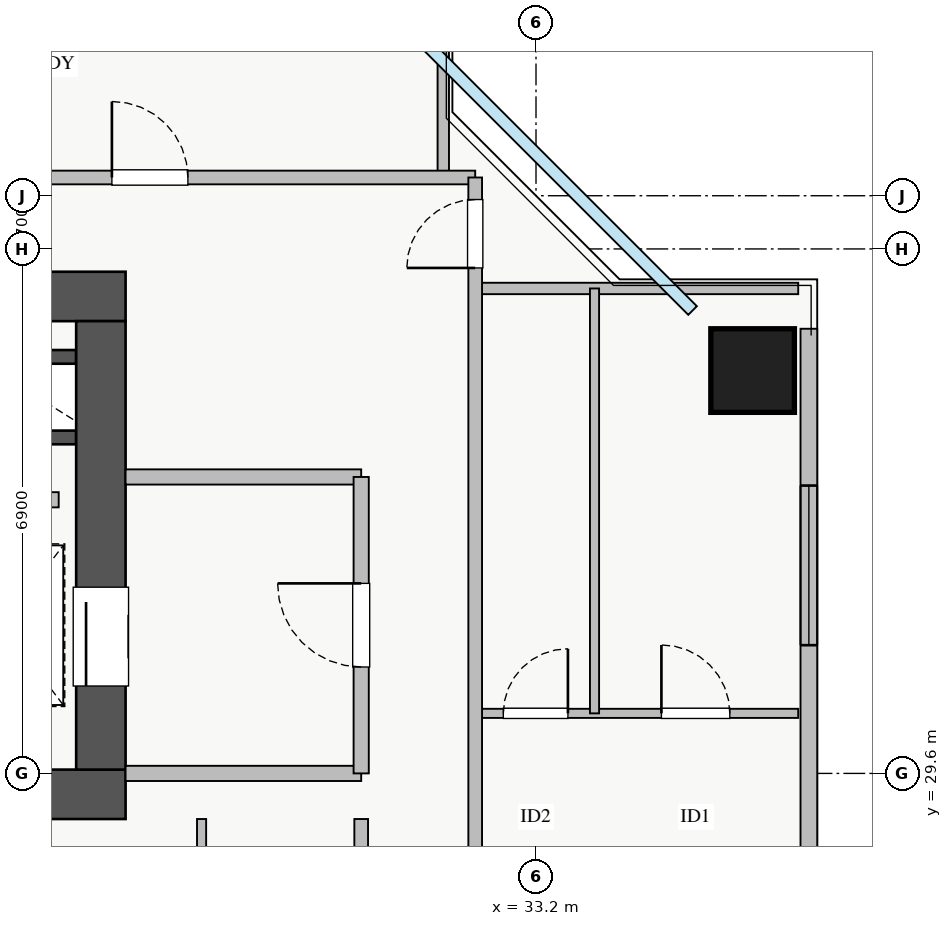
"""IFC4 building model, lengths in metres.
Left out: names, types, materials, properties, quantities, classifications, styles, units other than length and angle.
Written with IfcOpenShell. Run it as: python <this file> out.ifc"""

import sys

from ifc_helpers import new_model, si_unit, direction, frame, frame_2d, origin, origin_2d, place, context, subcontext, project, spatial, rectangle, extrude, source, transform, mapped, element, fill, save


model = new_model("IFC4")
c1 = context("Model", 3, precision=1e-05, world=origin(), true_north=direction((0.0, 1.0)))
c2 = subcontext(c1, "Body", "Model", "MODEL_VIEW")
j1 = project(units=[si_unit("LENGTHUNIT", "METRE"), si_unit("PLANEANGLEUNIT", "RADIAN")], contexts=[c1])
p1 = place(None, origin())
s1 = spatial("IfcSite", under=j1, at=p1, CompositionType="ELEMENT")
p2 = place(p1, origin())
s2 = spatial("IfcBuilding", under=s1, at=p2, CompositionType="ELEMENT")
p3 = place(p2, frame((0.0, 0.0, 136.0)))
s3 = spatial("IfcBuildingStorey", under=s2, at=p3, CompositionType="ELEMENT", Elevation=136.0)
for number, where, z_axis, x_axis in (
    (1, (25.8, 35.08, 0.0), (0.0, 0.0, 1.0), (1.0, 0.0, 0.0)),
    (2, (25.8, 34.02, 0.0), (0.0, 0.0, 1.0), (1.0, 0.0, 0.0)),
):
    element("IfcWall", number, at=place(p3, frame(where, z_axis=z_axis, x_axis=x_axis)), inside=s3, PredefinedType="SHEAR", context=c2, shape_type="SweptSolid", body=[
        extrude(rectangle(XDim=1.35, YDim=0.18, at=frame_2d((0.675, 0.0))), origin(), (0.0, 0.0, 1.0), 3.03),
    ])
p4 = place(p3, frame((10.2, 29.325, 0.0), z_axis=(0.0, 0.0, 1.0), x_axis=(1.0, 0.0, 0.0)))
e3 = element("IfcWall", 3, at=p4, inside=s3, PredefinedType="SHEAR", context=c2, shape_type="SweptSolid", body=[
    extrude(rectangle(XDim=17.6, YDim=0.65, at=frame_2d((8.8, 0.0))), origin(), (0.0, 0.0, 1.0), 3.25),
])
p5 = place(p3, frame((10.2, 35.875, 0.0), z_axis=(0.0, 0.0, 1.0), x_axis=(1.0, 0.0, 0.0)))
e4 = element("IfcWall", 4, at=p5, inside=s3, PredefinedType="SHEAR", context=c2, shape_type="SweptSolid", body=[
    extrude(rectangle(XDim=17.6, YDim=0.65, at=frame_2d((8.8, 0.0))), origin(), (0.0, 0.0, 1.0), 3.25),
])
p6 = place(p5, frame((1.15, 0.0, 0.0)))
e5 = element("IfcOpeningElement", 5, at=p6, cuts=e4, PredefinedType="OPENING", context=c2, shape_type="SweptSolid", body=[
    extrude(rectangle(XDim=1.1, YDim=2.05, at=frame_2d((0.55, 1.025))), frame((0.0, 0.335, 0.0), z_axis=(0.0, -1.0, 0.0), x_axis=(1.0, 0.0, 0.0)), (0.0, 0.0, 1.0), 0.67),
])
p7 = place(p5, frame((8.3, 0.0, 0.0)))
e6 = element("IfcOpeningElement", 6, at=p7, cuts=e4, PredefinedType="OPENING", context=c2, shape_type="SweptSolid", body=[
    extrude(rectangle(XDim=1.1, YDim=2.05, at=frame_2d((0.55, 1.025))), frame((0.0, 0.335, 0.0), z_axis=(0.0, -1.0, 0.0), x_axis=(1.0, 0.0, 0.0)), (0.0, 0.0, 1.0), 0.67),
])
p8 = place(p5, frame((4.9, 0.0, 0.0)))
e7 = element("IfcOpeningElement", 7, at=p8, cuts=e4, PredefinedType="OPENING", context=c2, shape_type="SweptSolid", body=[
    extrude(rectangle(XDim=1.1, YDim=2.05, at=frame_2d((0.55, 1.025))), frame((0.0, 0.335, 0.0), z_axis=(0.0, -1.0, 0.0), x_axis=(1.0, 0.0, 0.0)), (0.0, 0.0, 1.0), 0.67),
])
p9 = place(p5, frame((14.74, 0.0, 0.0)))
e8 = element("IfcOpeningElement", 8, at=p9, cuts=e4, PredefinedType="OPENING", context=c2, shape_type="SweptSolid", body=[
    extrude(rectangle(XDim=1.0, YDim=2.05, at=frame_2d((0.5, 1.025))), frame((0.0, 0.335, 0.0), z_axis=(0.0, -1.0, 0.0), x_axis=(1.0, 0.0, 0.0)), (0.0, 0.0, 1.0), 0.67),
])
p10 = place(p5, frame((10.175, 0.0, 0.0)))
e9 = element("IfcOpeningElement", 9, at=p10, cuts=e4, PredefinedType="OPENING", context=c2, shape_type="SweptSolid", body=[
    extrude(rectangle(XDim=1.0, YDim=2.05, at=frame_2d((0.5, 1.025))), frame((0.0, 0.335, 0.0), z_axis=(0.0, -1.0, 0.0), x_axis=(1.0, 0.0, 0.0)), (0.0, 0.0, 1.0), 0.67),
])
p11 = place(p5, frame((12.625, 0.0, 0.0)))
e10 = element("IfcOpeningElement", 10, at=p11, cuts=e4, PredefinedType="OPENING", context=c2, shape_type="SweptSolid", body=[
    extrude(rectangle(XDim=1.0, YDim=2.05, at=frame_2d((0.5, 1.025))), frame((0.0, 0.335, 0.0), z_axis=(0.0, -1.0, 0.0), x_axis=(1.0, 0.0, 0.0)), (0.0, 0.0, 1.0), 0.67),
])
p12 = place(p3, frame((27.475, 29.65, 0.0), z_axis=(0.0, 0.0, 1.0), x_axis=(0.0, 1.0, 0.0)))
e11 = element("IfcWall", 11, at=p12, inside=s3, PredefinedType="SHEAR", context=c2, shape_type="SweptSolid", body=[
    extrude(rectangle(XDim=5.9, YDim=0.65, at=frame_2d((2.95, 0.0))), origin(), (0.0, 0.0, 1.0), 3.25),
])
p13 = place(p12, frame((1.1, 0.0, 0.0)))
e12 = element("IfcOpeningElement", 12, at=p13, cuts=e11, PredefinedType="OPENING", context=c2, shape_type="SweptSolid", body=[
    extrude(rectangle(XDim=1.3, YDim=2.05, at=frame_2d((0.65, 1.025))), frame((0.0, 0.335, 0.0), z_axis=(0.0, -1.0, 0.0), x_axis=(1.0, 0.0, 0.0)), (0.0, 0.0, 1.0), 0.67),
])
m1 = source(origin(), c2, "Body", "SweptSolid", [
    extrude(rectangle(XDim=1.1, YDim=1.1, at=origin_2d()), origin(), (0.0, 0.0, 1.0), 3.25),
])
p14 = place(p3, frame((36.05, 34.9, 0.0), z_axis=(0.0, 0.0, 1.0), x_axis=(1.0, 0.0, 0.0)))
e13 = element("IfcColumn", 13, at=p14, inside=s3, PredefinedType="COLUMN", context=c2, shape_type="MappedRepresentation", body=[
    mapped(m1, transform((0.0, 0.0, 0.0), x_axis=(1.0, 0.0, 0.0), y_axis=(0.0, 1.0, 0.0), z_axis=(0.0, 0.0, 1.0), scale=1.0)),
])
p15 = place(p3, frame((36.79, 10.55, 0.0), z_axis=(0.0, 0.0, 1.0), x_axis=(0.0, 1.0, 0.0)))
e14 = element("IfcWall", 14, at=p15, inside=s3, PredefinedType="STANDARD", context=c2, shape_type="SweptSolid", body=[
    extrude(rectangle(XDim=24.9, YDim=0.22, at=frame_2d((12.45, 0.0))), origin(), (0.0, 0.0, 1.0), 2.57),
])
p16 = place(p15, frame((13.3, 0.0, 0.0)))
e15 = element("IfcOpeningElement", 15, at=p16, cuts=e14, PredefinedType="OPENING", context=c2, shape_type="SweptSolid", body=[
    extrude(rectangle(XDim=1.2, YDim=2.1, at=frame_2d((0.6, 1.05))), frame((0.0, 0.12, 0.0), z_axis=(0.0, -1.0, 0.0), x_axis=(1.0, 0.0, 0.0)), (0.0, 0.0, 1.0), 0.24),
])
p17 = place(p15, frame((1.912, 0.0, 0.9)))
e16 = element("IfcOpeningElement", 16, at=p17, cuts=e14, PredefinedType="OPENING", context=c2, shape_type="SweptSolid", body=[
    extrude(rectangle(XDim=2.4, YDim=1.48, at=frame_2d((1.2, 0.74))), frame((0.0, 0.12, 0.0), z_axis=(0.0, -1.0, 0.0), x_axis=(1.0, 0.0, 0.0)), (0.0, 0.0, 1.0), 0.24),
])
p18 = place(p15, frame((20.737, 0.0, 0.9)))
e17 = element("IfcOpeningElement", 17, at=p18, cuts=e14, PredefinedType="OPENING", context=c2, shape_type="SweptSolid", body=[
    extrude(rectangle(XDim=2.1, YDim=1.48, at=frame_2d((1.05, 0.74))), frame((0.0, 0.12, 0.0), z_axis=(0.0, -1.0, 0.0), x_axis=(1.0, 0.0, 0.0)), (0.0, 0.0, 1.0), 0.24),
])
p19 = place(p15, frame((14.72, 0.0, 0.9)))
e18 = element("IfcOpeningElement", 18, at=p19, cuts=e14, PredefinedType="OPENING", context=c2, shape_type="SweptSolid", body=[
    extrude(rectangle(XDim=0.9, YDim=1.2, at=frame_2d((0.45, 0.6))), frame((0.0, 0.12, 0.0), z_axis=(0.0, -1.0, 0.0), x_axis=(1.0, 0.0, 0.0)), (0.0, 0.0, 1.0), 0.24),
])
for number, where, z_axis, x_axis in (
    (19, (27.8, 29.6, 0.0), (0.0, 0.0, 1.0), (1.0, 0.0, 0.0)),
    (20, (27.8, 33.5, 0.0), (0.0, 0.0, 1.0), (1.0, 0.0, 0.0)),
):
    element("IfcWall", number, at=place(p3, frame(where, z_axis=z_axis, x_axis=x_axis)), inside=s3, PredefinedType="PARTITIONING", context=c2, shape_type="SweptSolid", body=[
        extrude(rectangle(XDim=3.1, YDim=0.2, at=frame_2d((1.55, 0.0))), origin(), (0.0, 0.0, 1.0), 3.03),
    ])
p20 = place(p3, frame((30.9, 29.6, 0.0), z_axis=(0.0, 0.0, 1.0), x_axis=(0.0, 1.0, 0.0)))
e21 = element("IfcWall", 21, at=p20, inside=s3, PredefinedType="PARTITIONING", context=c2, shape_type="SweptSolid", body=[
    extrude(rectangle(XDim=3.9, YDim=0.2, at=frame_2d((1.95, 0.0))), origin(), (0.0, 0.0, 1.0), 3.03),
])
p21 = place(p20, frame((1.4, 0.0, 0.0)))
e22 = element("IfcOpeningElement", 22, at=p21, cuts=e21, PredefinedType="OPENING", context=c2, shape_type="SweptSolid", body=[
    extrude(rectangle(XDim=1.1, YDim=2.05, at=frame_2d((0.55, 1.025))), frame((0.0, 0.11, 0.0), z_axis=(0.0, -1.0, 0.0), x_axis=(1.0, 0.0, 0.0)), (0.0, 0.0, 1.0), 0.22),
])
p22 = place(p3, frame((21.75, 33.2, 0.0), z_axis=(0.0, 0.0, 1.0), x_axis=(1.0, 0.0, 0.0)))
e23 = element("IfcWall", 23, at=p22, inside=s3, PredefinedType="PARTITIONING", context=c2, shape_type="SweptSolid", body=[
    extrude(rectangle(XDim=5.17, YDim=0.2, at=frame_2d((2.585, 0.0))), origin(), (0.0, 0.0, 1.0), 3.03),
])
p23 = place(p3, frame((31.98, 37.44, 0.0), z_axis=(0.0, 0.0, 1.0), x_axis=(0.0, 1.0, 0.0)))
e24 = element("IfcWall", 24, at=p23, inside=s3, PredefinedType="PARTITIONING", context=c2, shape_type="SweptSolid", body=[
    extrude(rectangle(XDim=3.21, YDim=0.15, at=frame_2d((1.605, 0.0))), origin(), (0.0, 0.0, 1.0), 3.03),
])
p24 = place(p3, frame((8.82, 37.44, 0.0), z_axis=(0.0, 0.0, 1.0), x_axis=(1.0, 0.0, 0.0)))
e25 = element("IfcWall", 25, at=p24, inside=s3, PredefinedType="PARTITIONING", context=c2, shape_type="SweptSolid", body=[
    extrude(rectangle(XDim=23.58, YDim=0.18, at=frame_2d((11.79, 0.0))), origin(), (0.0, 0.0, 1.0), 3.03),
])
p25 = place(p24, frame((3.085, 0.0, 0.0)))
e26 = element("IfcOpeningElement", 26, at=p25, cuts=e25, PredefinedType="OPENING", context=c2, shape_type="SweptSolid", body=[
    extrude(rectangle(XDim=1.0, YDim=2.05, at=frame_2d((0.5, 1.025))), frame((0.0, 0.1, 0.0), z_axis=(0.0, -1.0, 0.0), x_axis=(1.0, 0.0, 0.0)), (0.0, 0.0, 1.0), 0.2),
])
p26 = place(p24, frame((10.805, 0.0, 0.0)))
e27 = element("IfcOpeningElement", 27, at=p26, cuts=e25, PredefinedType="OPENING", context=c2, shape_type="SweptSolid", body=[
    extrude(rectangle(XDim=1.0, YDim=2.05, at=frame_2d((0.5, 1.025))), frame((0.0, 0.1, 0.0), z_axis=(0.0, -1.0, 0.0), x_axis=(1.0, 0.0, 0.0)), (0.0, 0.0, 1.0), 0.2),
])
p27 = place(p24, frame((18.8, 0.0, 0.0)))
e28 = element("IfcOpeningElement", 28, at=p27, cuts=e25, PredefinedType="OPENING", context=c2, shape_type="SweptSolid", body=[
    extrude(rectangle(XDim=1.0, YDim=2.05, at=frame_2d((0.5, 1.025))), frame((0.0, 0.1, 0.0), z_axis=(0.0, -1.0, 0.0), x_axis=(1.0, 0.0, 0.0)), (0.0, 0.0, 1.0), 0.2),
])
p28 = place(p3, frame((32.4, 35.98, 0.0), z_axis=(0.0, 0.0, 1.0), x_axis=(1.0, 0.0, 0.0)))
e29 = element("IfcWall", 29, at=p28, inside=s3, PredefinedType="PARTITIONING", context=c2, shape_type="SweptSolid", body=[
    extrude(rectangle(XDim=4.25, YDim=0.15, at=frame_2d((2.125, 0.0))), origin(), (0.0, 0.0, 1.0), 3.03),
])
p29 = place(p3, frame((32.4, 30.39, 0.0), z_axis=(0.0, 0.0, 1.0), x_axis=(1.0, 0.0, 0.0)))
e30 = element("IfcWall", 30, at=p29, inside=s3, PredefinedType="PLUMBINGWALL", context=c2, shape_type="SweptSolid", body=[
    extrude(rectangle(XDim=4.25, YDim=0.12, at=frame_2d((2.125, 0.0))), origin(), (0.0, 0.0, 1.0), 3.03),
])
p30 = place(p29, frame((0.37, 0.0, 0.0)))
e31 = element("IfcOpeningElement", 31, at=p30, cuts=e30, PredefinedType="OPENING", context=c2, shape_type="SweptSolid", body=[
    extrude(rectangle(XDim=0.85, YDim=2.05, at=frame_2d((0.425, 1.025))), frame((0.0, 0.07, 0.0), z_axis=(0.0, -1.0, 0.0), x_axis=(1.0, 0.0, 0.0)), (0.0, 0.0, 1.0), 0.14),
])
p31 = place(p29, frame((2.45, 0.0, 0.0)))
e32 = element("IfcOpeningElement", 32, at=p31, cuts=e30, PredefinedType="OPENING", context=c2, shape_type="SweptSolid", body=[
    extrude(rectangle(XDim=0.9, YDim=2.05, at=frame_2d((0.45, 1.025))), frame((0.0, 0.07, 0.0), z_axis=(0.0, -1.0, 0.0), x_axis=(1.0, 0.0, 0.0)), (0.0, 0.0, 1.0), 0.14),
])
p32 = place(p3, frame((33.97, 30.39, 0.0), z_axis=(0.0, 0.0, 1.0), x_axis=(0.0, 1.0, 0.0)))
e33 = element("IfcWall", 33, at=p32, inside=s3, PredefinedType="PLUMBINGWALL", context=c2, shape_type="SweptSolid", body=[
    extrude(rectangle(XDim=5.59, YDim=0.12, at=frame_2d((2.795, 0.0))), origin(), (0.0, 0.0, 1.0), 3.03),
])
p33 = place(p3, frame((32.4, 8.31, 0.0), z_axis=(0.0, 0.0, 1.0), x_axis=(0.0, 1.0, 0.0)))
e34 = element("IfcWall", 34, at=p33, inside=s3, PredefinedType="PARTITIONING", context=c2, shape_type="SweptSolid", body=[
    extrude(rectangle(XDim=29.13, YDim=0.18, at=frame_2d((14.565, 0.0))), origin(), (0.0, 0.0, 1.0), 3.03),
])
p34 = place(p33, frame((27.94, 0.0, 0.0)))
e35 = element("IfcOpeningElement", 35, at=p34, cuts=e34, PredefinedType="OPENING", context=c2, shape_type="SweptSolid", body=[
    extrude(rectangle(XDim=0.9, YDim=2.05, at=frame_2d((0.45, 1.025))), frame((0.0, 0.1, 0.0), z_axis=(0.0, -1.0, 0.0), x_axis=(1.0, 0.0, 0.0)), (0.0, 0.0, 1.0), 0.2),
])
p35 = place(p33, frame((0.415, 0.0, 0.0)))
e36 = element("IfcOpeningElement", 36, at=p35, cuts=e34, PredefinedType="OPENING", context=c2, shape_type="SweptSolid", body=[
    extrude(rectangle(XDim=0.9, YDim=2.05, at=frame_2d((0.45, 1.025))), frame((0.0, 0.1, 0.0), z_axis=(0.0, -1.0, 0.0), x_axis=(1.0, 0.0, 0.0)), (0.0, 0.0, 1.0), 0.2),
])
p36 = place(p33, frame((4.75, 0.0, 0.0)))
e37 = element("IfcOpeningElement", 37, at=p36, cuts=e34, PredefinedType="OPENING", context=c2, shape_type="SweptSolid", body=[
    extrude(rectangle(XDim=1.0, YDim=2.05, at=frame_2d((0.5, 1.025))), frame((0.0, 0.1, 0.0), z_axis=(0.0, -1.0, 0.0), x_axis=(1.0, 0.0, 0.0)), (0.0, 0.0, 1.0), 0.2),
])
p37 = place(p33, frame((18.11, 0.0, 0.0)))
e38 = element("IfcOpeningElement", 38, at=p37, cuts=e34, PredefinedType="OPENING", context=c2, shape_type="SweptSolid", body=[
    extrude(rectangle(XDim=1.0, YDim=2.05, at=frame_2d((0.5, 1.025))), frame((0.0, 0.1, 0.0), z_axis=(0.0, -1.0, 0.0), x_axis=(1.0, 0.0, 0.0)), (0.0, 0.0, 1.0), 0.2),
])
p38 = place(p3, frame((28.8, 23.1, 0.0), z_axis=(0.0, 0.0, 1.0), x_axis=(0.0, 1.0, 0.0)))
e39 = element("IfcWall", 39, at=p38, inside=s3, PredefinedType="PLUMBINGWALL", context=c2, shape_type="SweptSolid", body=[
    extrude(rectangle(XDim=5.9, YDim=0.12, at=frame_2d((2.95, 0.0))), origin(), (0.0, 0.0, 1.0), 3.03),
])
p39 = place(p3, frame((30.9, 17.0, 0.0), z_axis=(0.0, 0.0, 1.0), x_axis=(0.0, 1.0, 0.0)))
e40 = element("IfcWall", 40, at=p39, inside=s3, PredefinedType="PARTITIONING", context=c2, shape_type="SweptSolid", body=[
    extrude(rectangle(XDim=12.0, YDim=0.18, at=frame_2d((6.0, 0.0))), origin(), (0.0, 0.0, 1.0), 3.03),
])
p40 = place(p39, frame((2.36, 0.0, 0.0)))
e41 = element("IfcOpeningElement", 41, at=p40, cuts=e40, PredefinedType="OPENING", context=c2, shape_type="SweptSolid", body=[
    extrude(rectangle(XDim=1.0, YDim=2.05, at=frame_2d((0.5, 1.025))), frame((0.0, 0.1, 0.0), z_axis=(0.0, -1.0, 0.0), x_axis=(1.0, 0.0, 0.0)), (0.0, 0.0, 1.0), 0.2),
])
m2 = source(origin(), c2, "Body", "SweptSolid", [
    extrude(rectangle(XDim=2.1, YDim=1.48, at=frame_2d((1.05, 0.74))), frame((0.0, 0.03, 0.0), z_axis=(0.0, -1.0, 0.0), x_axis=(1.0, 0.0, 0.0)), (0.0, 0.0, 1.0), 0.06),
])
p41 = place(p18, origin())
e42 = element("IfcWindow", 42, at=p41, inside=s3, PartitioningType="TRIPLE_PANEL_VERTICAL", PredefinedType="WINDOW", context=c2, shape_type="MappedRepresentation", body=[
    mapped(m2, transform((0.0, 0.0, 0.0), x_axis=(1.0, 0.0, 0.0), y_axis=(0.0, 1.0, 0.0), z_axis=(0.0, 0.0, 1.0), scale=1.0)),
])
fill(e17, e42)
m3 = source(origin(), c2, "Body", "SweptSolid", [
    extrude(rectangle(XDim=1.3, YDim=2.05, at=frame_2d((0.65, 1.025))), frame((0.0, 0.025, 0.0), z_axis=(0.0, -1.0, 0.0), x_axis=(1.0, 0.0, 0.0)), (0.0, 0.0, 1.0), 0.05),
])
p42 = place(p13, origin())
e43 = element("IfcDoor", 43, at=p42, inside=s3, OperationType="SLIDING_TO_LEFT", PredefinedType="DOOR", context=c2, shape_type="MappedRepresentation", body=[
    mapped(m3, transform((0.0, 0.0, 0.0), x_axis=(1.0, 0.0, 0.0), y_axis=(0.0, 1.0, 0.0), z_axis=(0.0, 0.0, 1.0), scale=1.0)),
])
fill(e12, e43)
m4 = source(origin(), c2, "Body", "SweptSolid", [
    extrude(rectangle(XDim=1.1, YDim=2.05, at=frame_2d((0.55, 1.025))), frame((0.0, 0.025, 0.0), z_axis=(0.0, -1.0, 0.0), x_axis=(1.0, 0.0, 0.0)), (0.0, 0.0, 1.0), 0.05),
])
p43 = place(p21, origin())
e44 = element("IfcDoor", 44, at=p43, inside=s3, OperationType="SINGLE_SWING_RIGHT", PredefinedType="DOOR", context=c2, shape_type="MappedRepresentation", body=[
    mapped(m4, transform((0.0, 0.0, 0.0), x_axis=(1.0, 0.0, 0.0), y_axis=(0.0, 1.0, 0.0), z_axis=(0.0, 0.0, 1.0), scale=1.0)),
])
fill(e22, e44)
m5 = source(origin(), c2, "Body", "SweptSolid", [
    extrude(rectangle(XDim=1.0, YDim=2.05, at=frame_2d((0.5, 1.025))), frame((0.0, 0.025, 0.0), z_axis=(0.0, -1.0, 0.0), x_axis=(1.0, 0.0, 0.0)), (0.0, 0.0, 1.0), 0.05),
])
p44 = place(p27, origin())
e45 = element("IfcDoor", 45, at=p44, inside=s3, OperationType="SINGLE_SWING_LEFT", PredefinedType="DOOR", context=c2, shape_type="MappedRepresentation", body=[
    mapped(m5, transform((0.0, 0.0, 0.0), x_axis=(1.0, 0.0, 0.0), y_axis=(0.0, 1.0, 0.0), z_axis=(0.0, 0.0, 1.0), scale=1.0)),
])
fill(e28, e45)
m6 = source(origin(), c2, "Body", "SweptSolid", [
    extrude(rectangle(XDim=0.85, YDim=2.05, at=frame_2d((0.425, 1.025))), frame((0.0, 0.025, 0.0), z_axis=(0.0, -1.0, 0.0), x_axis=(1.0, 0.0, 0.0)), (0.0, 0.0, 1.0), 0.05),
])
p45 = place(p30, origin())
e46 = element("IfcDoor", 46, at=p45, inside=s3, OperationType="SINGLE_SWING_RIGHT", PredefinedType="DOOR", context=c2, shape_type="MappedRepresentation", body=[
    mapped(m6, transform((0.0, 0.0, 0.0), x_axis=(1.0, 0.0, 0.0), y_axis=(0.0, 1.0, 0.0), z_axis=(0.0, 0.0, 1.0), scale=1.0)),
])
fill(e31, e46)
m7 = source(origin(), c2, "Body", "SweptSolid", [
    extrude(rectangle(XDim=0.9, YDim=2.05, at=frame_2d((0.45, 1.025))), frame((0.0, 0.025, 0.0), z_axis=(0.0, -1.0, 0.0), x_axis=(1.0, 0.0, 0.0)), (0.0, 0.0, 1.0), 0.05),
])
p46 = place(p31, origin())
e47 = element("IfcDoor", 47, at=p46, inside=s3, OperationType="SINGLE_SWING_LEFT", PredefinedType="DOOR", context=c2, shape_type="MappedRepresentation", body=[
    mapped(m7, transform((0.0, 0.0, 0.0), x_axis=(1.0, 0.0, 0.0), y_axis=(0.0, 1.0, 0.0), z_axis=(0.0, 0.0, 1.0), scale=1.0)),
])
fill(e32, e47)
p47 = place(p34, origin())
e48 = element("IfcDoor", 48, at=p47, inside=s3, OperationType="SINGLE_SWING_LEFT", PredefinedType="DOOR", context=c2, shape_type="MappedRepresentation", body=[
    mapped(m7, transform((0.0, 0.0, 0.0), x_axis=(1.0, 0.0, 0.0), y_axis=(0.0, 1.0, 0.0), z_axis=(0.0, 0.0, 1.0), scale=1.0)),
])
fill(e35, e48)
save(model, sys.argv[1])
